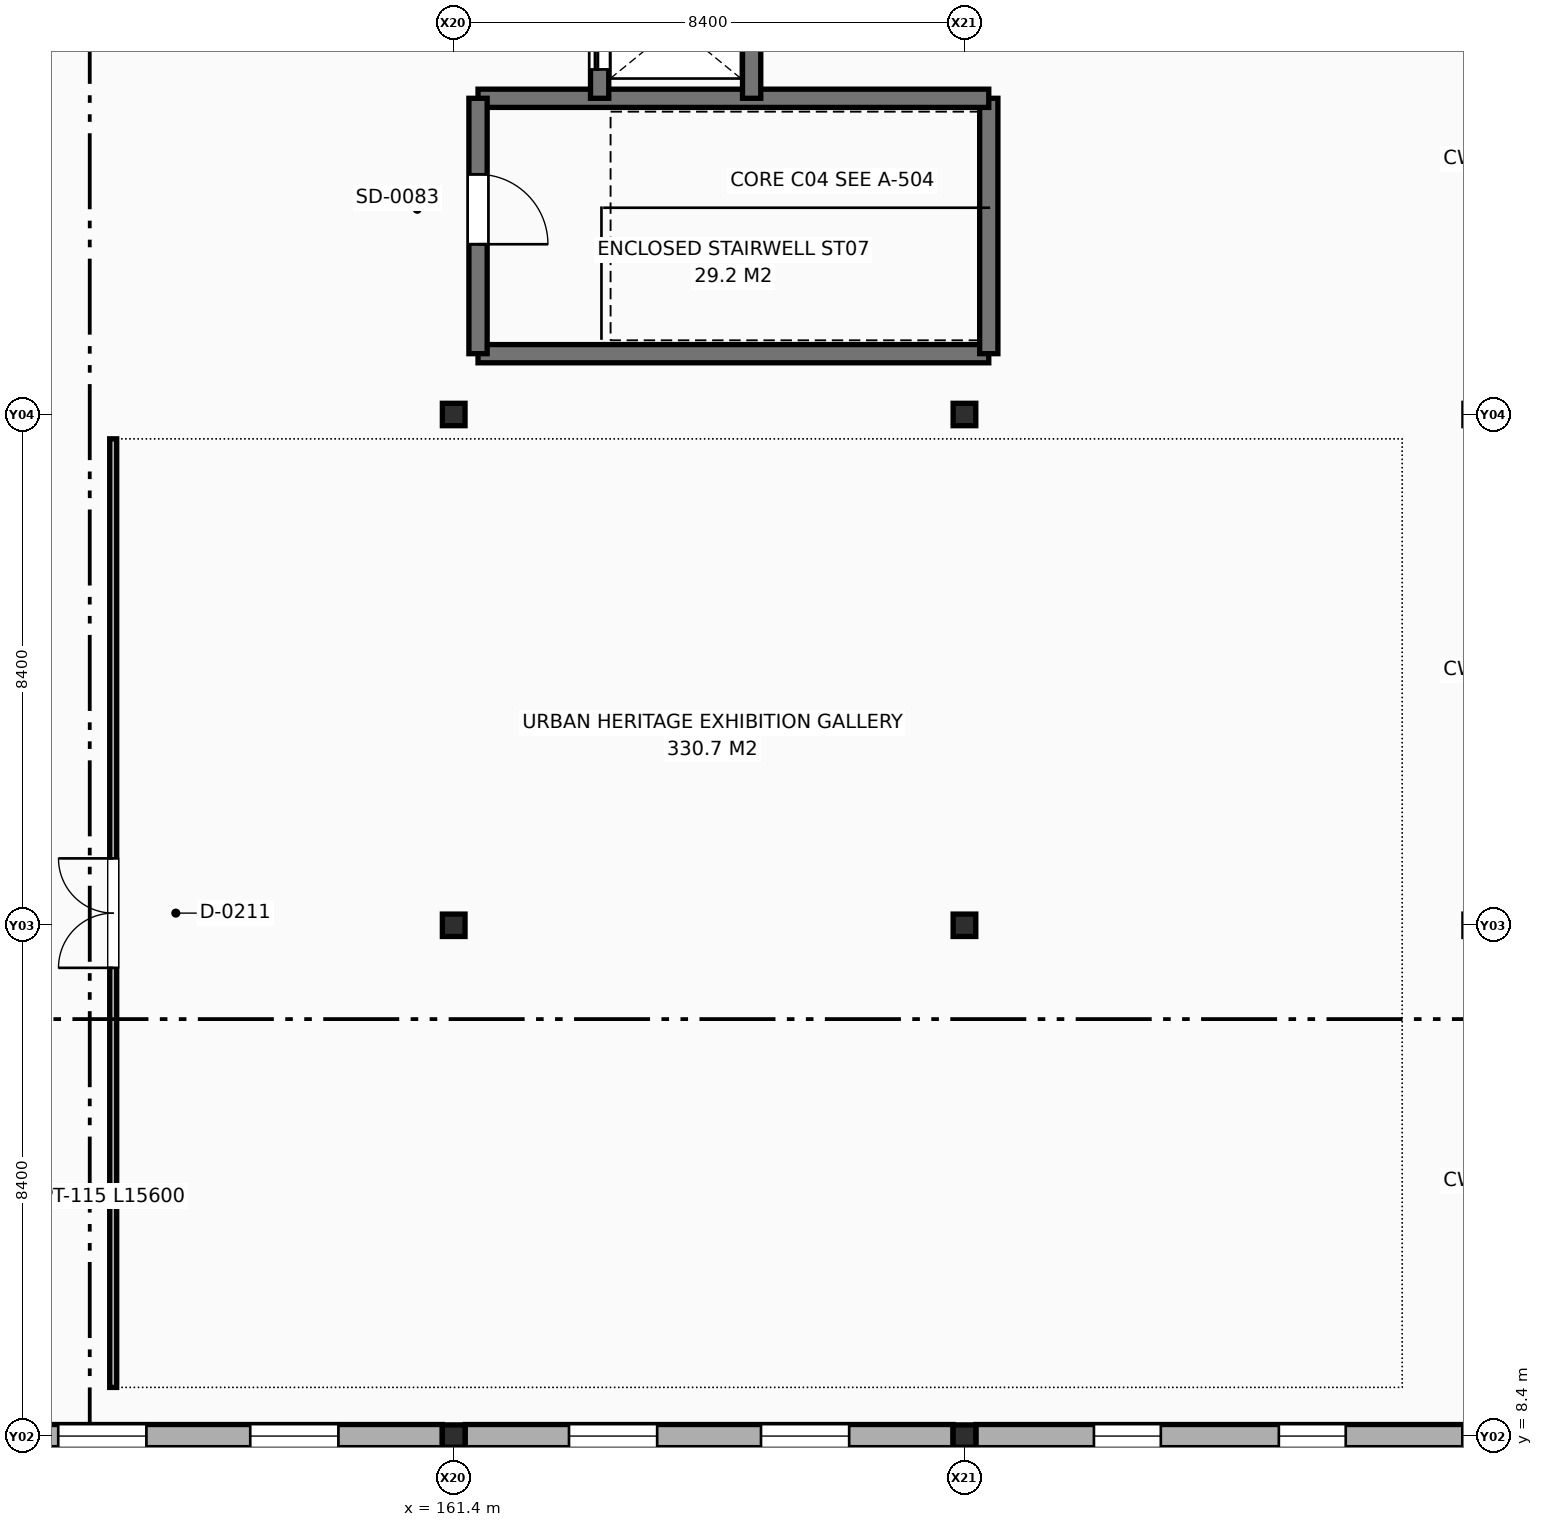
"""IFC4 building model, lengths in metres.
Left out: names, types, materials, properties, quantities, classifications, styles, units other than length and angle.
Written with IfcOpenShell. Run it as: python <this file> out.ifc"""

import sys

from ifc_helpers import new_model, si_unit, direction, frame, frame_2d, origin, origin_2d, place, context, subcontext, project, spatial, rectangle, i_section, extrude, element, fill, save


model = new_model("IFC4")
c1 = context("Model", 3, precision=1e-05, world=origin(), true_north=direction((0.0, 1.0)))
c2 = subcontext(c1, "Body", "Model", "MODEL_VIEW")
j1 = project(units=[si_unit("LENGTHUNIT", "METRE"), si_unit("PLANEANGLEUNIT", "RADIAN")], contexts=[c1])
p1 = place(None, origin())
s1 = spatial("IfcSite", under=j1, at=p1, CompositionType="ELEMENT")
p2 = place(p1, origin())
s2 = spatial("IfcBuilding", under=s1, at=p2, CompositionType="ELEMENT")
p3 = place(p2, frame((0.0, 0.0, 9.6)))
s3 = spatial("IfcBuildingStorey", under=s2, at=p3, CompositionType="ELEMENT", Elevation=9.6)
for number, where, z_axis, x_axis in (
    (1, (161.4, 8.4, 0.0), (0.0, 0.0, 1.0), (1.0, 0.0, 0.0)),
    (2, (161.4, 16.8, 0.0), (0.0, 0.0, 1.0), (1.0, 0.0, 0.0)),
    (3, (161.4, 25.2, 0.0), (0.0, 0.0, 1.0), (1.0, 0.0, 0.0)),
    (4, (169.8, 8.4, 0.0), (0.0, 0.0, 1.0), (1.0, 0.0, 0.0)),
    (5, (169.8, 16.8, 0.0), (0.0, 0.0, 1.0), (1.0, 0.0, 0.0)),
    (6, (169.8, 25.2, 0.0), (0.0, 0.0, 1.0), (1.0, 0.0, 0.0)),
):
    element("IfcColumn", number, at=place(p3, frame(where, z_axis=z_axis, x_axis=x_axis)), inside=s3, PredefinedType="COLUMN", context=c2, shape_type="SweptSolid", body=[
        extrude(i_section(OverallWidth=0.373, OverallDepth=0.368, WebThickness=0.014, FlangeThickness=0.024, FilletRadius=0.015, at=origin_2d()), origin(), (0.0, 0.0, 1.0), 4.2),
    ])
p4 = place(p3, frame((153.188, 8.4, 0.0), z_axis=(0.0, 0.0, 1.0), x_axis=(1.0, 0.0, 0.0)))
e7 = element("IfcWall", 7, at=p4, inside=s3, PredefinedType="SOLIDWALL", context=c2, shape_type="SweptSolid", body=[
    extrude(rectangle(XDim=8.023, YDim=0.38, at=frame_2d((4.012, 0.0))), origin(), (0.0, 0.0, 1.0), 2.97),
])
p5 = place(p4, frame((1.708, 0.0, 0.9)))
e8 = element("IfcOpeningElement", 8, at=p5, cuts=e7, PredefinedType="OPENING", context=c2, shape_type="SweptSolid", body=[
    extrude(rectangle(XDim=1.45, YDim=1.5, at=frame_2d((0.725, 0.75))), frame((0.0, 0.2, 0.0), z_axis=(0.0, -1.0, 0.0), x_axis=(1.0, 0.0, 0.0)), (0.0, 0.0, 1.0), 0.4),
])
p6 = place(p4, frame((4.865, 0.0, 0.9)))
e9 = element("IfcOpeningElement", 9, at=p6, cuts=e7, PredefinedType="OPENING", context=c2, shape_type="SweptSolid", body=[
    extrude(rectangle(XDim=1.45, YDim=1.5, at=frame_2d((0.725, 0.75))), frame((0.0, 0.2, 0.0), z_axis=(0.0, -1.0, 0.0), x_axis=(1.0, 0.0, 0.0)), (0.0, 0.0, 1.0), 0.4),
])
p7 = place(p3, frame((161.588, 8.4, 0.0), z_axis=(0.0, 0.0, 1.0), x_axis=(1.0, 0.0, 0.0)))
e10 = element("IfcWall", 10, at=p7, inside=s3, PredefinedType="SOLIDWALL", context=c2, shape_type="SweptSolid", body=[
    extrude(rectangle(XDim=8.023, YDim=0.38, at=frame_2d((4.012, 0.0))), origin(), (0.0, 0.0, 1.0), 2.97),
])
p8 = place(p7, frame((1.708, 0.0, 0.9)))
e11 = element("IfcOpeningElement", 11, at=p8, cuts=e10, PredefinedType="OPENING", context=c2, shape_type="SweptSolid", body=[
    extrude(rectangle(XDim=1.45, YDim=1.5, at=frame_2d((0.725, 0.75))), frame((0.0, 0.2, 0.0), z_axis=(0.0, -1.0, 0.0), x_axis=(1.0, 0.0, 0.0)), (0.0, 0.0, 1.0), 0.4),
])
p9 = place(p7, frame((4.865, 0.0, 0.9)))
e12 = element("IfcOpeningElement", 12, at=p9, cuts=e10, PredefinedType="OPENING", context=c2, shape_type="SweptSolid", body=[
    extrude(rectangle(XDim=1.45, YDim=1.5, at=frame_2d((0.725, 0.75))), frame((0.0, 0.2, 0.0), z_axis=(0.0, -1.0, 0.0), x_axis=(1.0, 0.0, 0.0)), (0.0, 0.0, 1.0), 0.4),
])
p10 = place(p3, frame((169.988, 8.4, 0.0), z_axis=(0.0, 0.0, 1.0), x_axis=(1.0, 0.0, 0.0)))
e13 = element("IfcWall", 13, at=p10, inside=s3, PredefinedType="SOLIDWALL", context=c2, shape_type="SweptSolid", body=[
    extrude(rectangle(XDim=8.023, YDim=0.38, at=frame_2d((4.012, 0.0))), origin(), (0.0, 0.0, 1.0), 2.97),
])
p11 = place(p10, frame((1.941, 0.0, 0.9)))
e14 = element("IfcOpeningElement", 14, at=p11, cuts=e13, PredefinedType="OPENING", context=c2, shape_type="SweptSolid", body=[
    extrude(rectangle(XDim=1.1, YDim=1.8, at=frame_2d((0.55, 0.9))), frame((0.0, 0.2, 0.0), z_axis=(0.0, -1.0, 0.0), x_axis=(1.0, 0.0, 0.0)), (0.0, 0.0, 1.0), 0.4),
])
p12 = place(p10, frame((4.982, 0.0, 0.9)))
e15 = element("IfcOpeningElement", 15, at=p12, cuts=e13, PredefinedType="OPENING", context=c2, shape_type="SweptSolid", body=[
    extrude(rectangle(XDim=1.1, YDim=1.8, at=frame_2d((0.55, 0.9))), frame((0.0, 0.2, 0.0), z_axis=(0.0, -1.0, 0.0), x_axis=(1.0, 0.0, 0.0)), (0.0, 0.0, 1.0), 0.4),
])
p13 = place(p3, frame((161.8, 26.2, 0.0), z_axis=(0.0, 0.0, 1.0), x_axis=(1.0, 0.0, 0.0)))
e16 = element("IfcWall", 16, at=p13, inside=s3, PredefinedType="SHEAR", context=c2, shape_type="SweptSolid", body=[
    extrude(rectangle(XDim=8.4, YDim=0.3, at=frame_2d((4.2, 0.0))), origin(), (0.0, 0.0, 1.0), 3.92),
])
p14 = place(p3, frame((170.2, 26.2, 0.0), z_axis=(0.0, 0.0, 1.0), x_axis=(0.0, 1.0, 0.0)))
e17 = element("IfcWall", 17, at=p14, inside=s3, PredefinedType="SHEAR", context=c2, shape_type="SweptSolid", body=[
    extrude(rectangle(XDim=4.2, YDim=0.3, at=frame_2d((2.1, 0.0))), origin(), (0.0, 0.0, 1.0), 3.92),
])
p15 = place(p3, frame((170.2, 30.4, 0.0), z_axis=(0.0, 0.0, 1.0), x_axis=(-1.0, 0.0, 0.0)))
e18 = element("IfcWall", 18, at=p15, inside=s3, PredefinedType="SHEAR", context=c2, shape_type="SweptSolid", body=[
    extrude(rectangle(XDim=8.4, YDim=0.3, at=frame_2d((4.2, 0.0))), origin(), (0.0, 0.0, 1.0), 3.92),
])
p16 = place(p3, frame((161.8, 30.4, 0.0), z_axis=(0.0, 0.0, 1.0), x_axis=(0.0, -1.0, 0.0)))
e19 = element("IfcWall", 19, at=p16, inside=s3, PredefinedType="SHEAR", context=c2, shape_type="SweptSolid", body=[
    extrude(rectangle(XDim=4.2, YDim=0.3, at=frame_2d((2.1, 0.0))), origin(), (0.0, 0.0, 1.0), 3.92),
])
p17 = place(p16, frame((1.25, 0.0, 0.0)))
e20 = element("IfcOpeningElement", 20, at=p17, cuts=e19, PredefinedType="OPENING", context=c2, shape_type="SweptSolid", body=[
    extrude(rectangle(XDim=1.15, YDim=2.2, at=frame_2d((0.575, 1.1))), frame((0.0, 0.16, 0.0), z_axis=(0.0, -1.0, 0.0), x_axis=(1.0, 0.0, 0.0)), (0.0, 0.0, 1.0), 0.32),
])
p18 = place(p3, frame((163.8, 32.8, 0.0), z_axis=(0.0, 0.0, 1.0), x_axis=(0.0, -1.0, 0.0)))
e21 = element("IfcWall", 21, at=p18, inside=s3, PredefinedType="SHEAR", context=c2, shape_type="SweptSolid", body=[
    extrude(rectangle(XDim=2.4, YDim=0.3, at=frame_2d((1.2, 0.0))), origin(), (0.0, 0.0, 1.0), 3.92),
])
p19 = place(p18, frame((0.475, 0.0, 0.0)))
e22 = element("IfcOpeningElement", 22, at=p19, cuts=e21, PredefinedType="OPENING", context=c2, shape_type="SweptSolid", body=[
    extrude(rectangle(XDim=1.45, YDim=2.35, at=frame_2d((0.725, 1.175))), frame((0.0, 0.16, 0.0), z_axis=(0.0, -1.0, 0.0), x_axis=(1.0, 0.0, 0.0)), (0.0, 0.0, 1.0), 0.32),
])
p20 = place(p3, frame((166.3, 30.4, 0.0), z_axis=(0.0, 0.0, 1.0), x_axis=(0.0, 1.0, 0.0)))
e23 = element("IfcWall", 23, at=p20, inside=s3, PredefinedType="SHEAR", context=c2, shape_type="SweptSolid", body=[
    extrude(rectangle(XDim=2.4, YDim=0.3, at=frame_2d((1.2, 0.0))), origin(), (0.0, 0.0, 1.0), 3.92),
])
p21 = place(p3, frame((155.8, 9.2, 0.0), z_axis=(0.0, 0.0, 1.0), x_axis=(0.0, 1.0, 0.0)))
e24 = element("IfcWall", 24, at=p21, inside=s3, PredefinedType="PARTITIONING", context=c2, shape_type="SweptSolid", body=[
    extrude(rectangle(XDim=15.6, YDim=0.115, at=frame_2d((7.8, 0.0))), origin(), (0.0, 0.0, 1.0), 3.86),
])
p22 = place(p21, frame((6.9, 0.0, 0.0)))
e25 = element("IfcOpeningElement", 25, at=p22, cuts=e24, PredefinedType="OPENING", context=c2, shape_type="SweptSolid", body=[
    extrude(rectangle(XDim=1.8, YDim=2.4, at=frame_2d((0.9, 1.2))), frame((0.0, 0.067, 0.0), z_axis=(0.0, -1.0, 0.0), x_axis=(1.0, 0.0, 0.0)), (0.0, 0.0, 1.0), 0.135),
])
p23 = place(p5, origin())
e26 = element("IfcWindow", 26, at=p23, inside=s3, PartitioningType="SINGLE_PANEL", PredefinedType="WINDOW", context=c2, shape_type="SweptSolid", body=[
    extrude(rectangle(XDim=1.45, YDim=1.5, at=frame_2d((0.725, 0.75))), frame((0.0, 0.03, 0.0), z_axis=(0.0, -1.0, 0.0), x_axis=(1.0, 0.0, 0.0)), (0.0, 0.0, 1.0), 0.06),
])
fill(e8, e26)
p24 = place(p6, origin())
e27 = element("IfcWindow", 27, at=p24, inside=s3, PartitioningType="SINGLE_PANEL", PredefinedType="WINDOW", context=c2, shape_type="SweptSolid", body=[
    extrude(rectangle(XDim=1.45, YDim=1.5, at=frame_2d((0.725, 0.75))), frame((0.0, 0.03, 0.0), z_axis=(0.0, -1.0, 0.0), x_axis=(1.0, 0.0, 0.0)), (0.0, 0.0, 1.0), 0.06),
])
fill(e9, e27)
p25 = place(p8, origin())
e28 = element("IfcWindow", 28, at=p25, inside=s3, PartitioningType="SINGLE_PANEL", PredefinedType="WINDOW", context=c2, shape_type="SweptSolid", body=[
    extrude(rectangle(XDim=1.45, YDim=1.5, at=frame_2d((0.725, 0.75))), frame((0.0, 0.03, 0.0), z_axis=(0.0, -1.0, 0.0), x_axis=(1.0, 0.0, 0.0)), (0.0, 0.0, 1.0), 0.06),
])
fill(e11, e28)
p26 = place(p9, origin())
e29 = element("IfcWindow", 29, at=p26, inside=s3, PartitioningType="SINGLE_PANEL", PredefinedType="WINDOW", context=c2, shape_type="SweptSolid", body=[
    extrude(rectangle(XDim=1.45, YDim=1.5, at=frame_2d((0.725, 0.75))), frame((0.0, 0.03, 0.0), z_axis=(0.0, -1.0, 0.0), x_axis=(1.0, 0.0, 0.0)), (0.0, 0.0, 1.0), 0.06),
])
fill(e12, e29)
p27 = place(p11, origin())
e30 = element("IfcWindow", 30, at=p27, inside=s3, PartitioningType="SINGLE_PANEL", PredefinedType="WINDOW", context=c2, shape_type="SweptSolid", body=[
    extrude(rectangle(XDim=1.1, YDim=1.8, at=frame_2d((0.55, 0.9))), frame((0.0, 0.03, 0.0), z_axis=(0.0, -1.0, 0.0), x_axis=(1.0, 0.0, 0.0)), (0.0, 0.0, 1.0), 0.06),
])
fill(e14, e30)
p28 = place(p12, origin())
e31 = element("IfcWindow", 31, at=p28, inside=s3, PartitioningType="SINGLE_PANEL", PredefinedType="WINDOW", context=c2, shape_type="SweptSolid", body=[
    extrude(rectangle(XDim=1.1, YDim=1.8, at=frame_2d((0.55, 0.9))), frame((0.0, 0.03, 0.0), z_axis=(0.0, -1.0, 0.0), x_axis=(1.0, 0.0, 0.0)), (0.0, 0.0, 1.0), 0.06),
])
fill(e15, e31)
p29 = place(p17, origin())
e32 = element("IfcDoor", 32, at=p29, inside=s3, OperationType="SINGLE_SWING_RIGHT", PredefinedType="DOOR", context=c2, shape_type="SweptSolid", body=[
    extrude(rectangle(XDim=1.15, YDim=2.2, at=frame_2d((0.575, 1.1))), frame((0.0, 0.025, 0.0), z_axis=(0.0, -1.0, 0.0), x_axis=(1.0, 0.0, 0.0)), (0.0, 0.0, 1.0), 0.05),
])
fill(e20, e32)
p30 = place(p19, origin())
e33 = element("IfcDoor", 33, at=p30, inside=s3, OperationType="SLIDING_TO_LEFT", PredefinedType="DOOR", context=c2, shape_type="SweptSolid", body=[
    extrude(rectangle(XDim=1.45, YDim=2.35, at=frame_2d((0.725, 1.175))), frame((0.0, 0.025, 0.0), z_axis=(0.0, -1.0, 0.0), x_axis=(1.0, 0.0, 0.0)), (0.0, 0.0, 1.0), 0.05),
])
fill(e22, e33)
p31 = place(p22, origin())
e34 = element("IfcDoor", 34, at=p31, inside=s3, OperationType="DOUBLE_DOOR_SINGLE_SWING", PredefinedType="DOOR", context=c2, shape_type="SweptSolid", body=[
    extrude(rectangle(XDim=1.8, YDim=2.4, at=frame_2d((0.9, 1.2))), frame((0.0, 0.025, 0.0), z_axis=(0.0, -1.0, 0.0), x_axis=(1.0, 0.0, 0.0)), (0.0, 0.0, 1.0), 0.05),
])
fill(e25, e34)
save(model, sys.argv[1])
